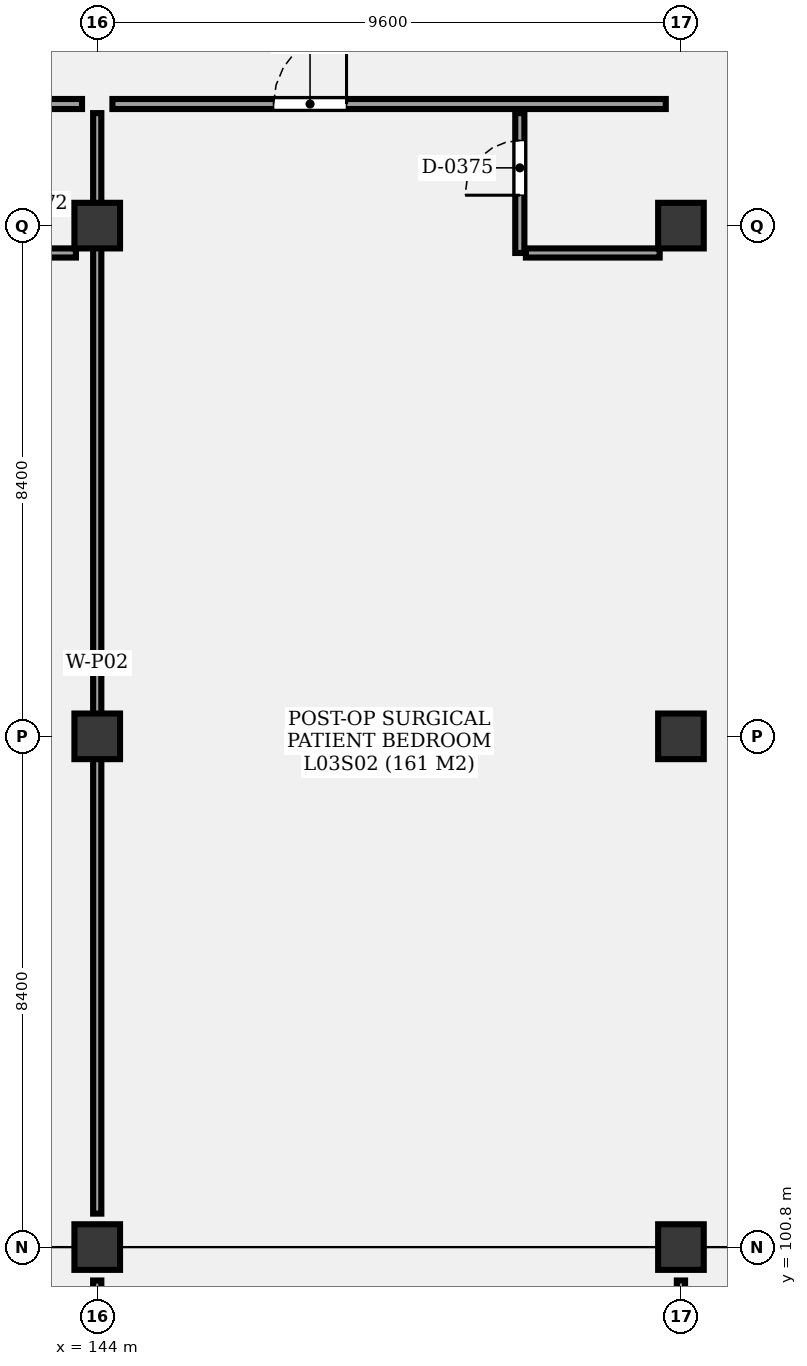
"""IFC4 building model, lengths in metres.
Left out: names, types, materials, properties, quantities, classifications, styles, units other than length and angle.
Written with IfcOpenShell. Run it as: python <this file> out.ifc"""

import sys

from ifc_helpers import new_model, si_unit, direction, frame, frame_2d, origin, origin_2d, place, context, subcontext, project, spatial, rectangle, extrude, element, fill, save


model = new_model("IFC4")
c1 = context("Model", 3, precision=1e-05, world=origin(), true_north=direction((0.0, 1.0)))
c2 = subcontext(c1, "Body", "Model", "MODEL_VIEW")
j1 = project(units=[si_unit("LENGTHUNIT", "METRE"), si_unit("PLANEANGLEUNIT", "RADIAN")], contexts=[c1])
p1 = place(None, origin())
s1 = spatial("IfcSite", under=j1, at=p1, CompositionType="ELEMENT")
p2 = place(p1, origin())
s2 = spatial("IfcBuilding", under=s1, at=p2, CompositionType="ELEMENT")
p3 = place(p2, frame((0.0, 0.0, 13.5)))
s3 = spatial("IfcBuildingStorey", under=s2, at=p3, CompositionType="ELEMENT", Elevation=13.5)
for number, where, z_axis, x_axis in (
    (1, (144.0, 100.8, 0.0), (0.0, 0.0, 1.0), (1.0, 0.0, 0.0)),
    (2, (144.0, 109.2, 0.0), (0.0, 0.0, 1.0), (1.0, 0.0, 0.0)),
    (3, (144.0, 117.6, 0.0), (0.0, 0.0, 1.0), (1.0, 0.0, 0.0)),
    (4, (153.6, 100.8, 0.0), (0.0, 0.0, 1.0), (1.0, 0.0, 0.0)),
    (5, (153.6, 109.2, 0.0), (0.0, 0.0, 1.0), (1.0, 0.0, 0.0)),
    (6, (153.6, 117.6, 0.0), (0.0, 0.0, 1.0), (1.0, 0.0, 0.0)),
):
    element("IfcColumn", number, at=place(p3, frame(where, z_axis=z_axis, x_axis=x_axis)), inside=s3, PredefinedType="COLUMN", context=c2, shape_type="SweptSolid", body=[
        extrude(rectangle(XDim=0.75, YDim=0.75, at=origin_2d()), origin(), (0.0, 0.0, 1.0), 4.3),
    ])
p4 = place(p3, frame((134.65, 119.6, 0.0), z_axis=(0.0, 0.0, 1.0), x_axis=(1.0, 0.0, 0.0)))
e7 = element("IfcWall", 7, at=p4, inside=s3, PredefinedType="PARTITIONING", context=c2, shape_type="SweptSolid", body=[
    extrude(rectangle(XDim=9.1, YDim=0.165, at=frame_2d((4.55, 0.0))), origin(), (0.0, 0.0, 1.0), 3.4),
])
p5 = place(p4, frame((2.65, 0.0, 0.0)))
e8 = element("IfcOpeningElement", 8, at=p5, cuts=e7, PredefinedType="OPENING", context=c2, shape_type="SweptSolid", body=[
    extrude(rectangle(XDim=1.25, YDim=2.2, at=frame_2d((0.625, 1.1))), frame((0.0, 0.093, 0.0), z_axis=(0.0, -1.0, 0.0), x_axis=(1.0, 0.0, 0.0)), (0.0, 0.0, 1.0), 0.185),
])
p6 = place(p3, frame((141.45, 117.15, 0.0), z_axis=(0.0, 0.0, 1.0), x_axis=(1.0, 0.0, 0.0)))
e9 = element("IfcWall", 9, at=p6, inside=s3, PredefinedType="PARTITIONING", context=c2, shape_type="SweptSolid", body=[
    extrude(rectangle(XDim=2.2, YDim=0.15, at=frame_2d((1.1, 0.0))), origin(), (0.0, 0.0, 1.0), 3.4),
])
p7 = place(p3, frame((144.25, 119.6, 0.0), z_axis=(0.0, 0.0, 1.0), x_axis=(1.0, 0.0, 0.0)))
e10 = element("IfcWall", 10, at=p7, inside=s3, PredefinedType="PARTITIONING", context=c2, shape_type="SweptSolid", body=[
    extrude(rectangle(XDim=9.1, YDim=0.165, at=frame_2d((4.55, 0.0))), origin(), (0.0, 0.0, 1.0), 3.4),
])
p8 = place(p7, frame((2.65, 0.0, 0.0)))
e11 = element("IfcOpeningElement", 11, at=p8, cuts=e10, PredefinedType="OPENING", context=c2, shape_type="SweptSolid", body=[
    extrude(rectangle(XDim=1.2, YDim=2.2, at=frame_2d((0.6, 1.1))), frame((0.0, 0.093, 0.0), z_axis=(0.0, -1.0, 0.0), x_axis=(1.0, 0.0, 0.0)), (0.0, 0.0, 1.0), 0.185),
])
p9 = place(p3, frame((150.95, 117.15, 0.0), z_axis=(0.0, 0.0, 1.0), x_axis=(0.0, 1.0, 0.0)))
e12 = element("IfcWall", 12, at=p9, inside=s3, PredefinedType="PARTITIONING", context=c2, shape_type="SweptSolid", body=[
    extrude(rectangle(XDim=2.3, YDim=0.15, at=frame_2d((1.15, 0.0))), origin(), (0.0, 0.0, 1.0), 3.4),
])
p10 = place(p9, frame((0.95, 0.0, 0.0)))
e13 = element("IfcOpeningElement", 13, at=p10, cuts=e12, PredefinedType="OPENING", context=c2, shape_type="SweptSolid", body=[
    extrude(rectangle(XDim=0.9, YDim=2.1, at=frame_2d((0.45, 1.05))), frame((0.0, 0.085, 0.0), z_axis=(0.0, -1.0, 0.0), x_axis=(1.0, 0.0, 0.0)), (0.0, 0.0, 1.0), 0.17),
])
p11 = place(p3, frame((151.05, 117.15, 0.0), z_axis=(0.0, 0.0, 1.0), x_axis=(1.0, 0.0, 0.0)))
e14 = element("IfcWall", 14, at=p11, inside=s3, PredefinedType="PARTITIONING", context=c2, shape_type="SweptSolid", body=[
    extrude(rectangle(XDim=2.2, YDim=0.15, at=frame_2d((1.1, 0.0))), origin(), (0.0, 0.0, 1.0), 3.4),
])
p12 = place(p3, frame((144.0, 101.35, 0.0), z_axis=(0.0, 0.0, 1.0), x_axis=(0.0, 1.0, 0.0)))
e15 = element("IfcWall", 15, at=p12, inside=s3, PredefinedType="PARTITIONING", context=c2, shape_type="SweptSolid", body=[
    extrude(rectangle(XDim=18.1, YDim=0.135, at=frame_2d((9.05, 0.0))), origin(), (0.0, 0.0, 1.0), 3.4),
])
for number, where, z_axis, x_axis in (
    (16, (144.0, 90.55, 0.0), (0.0, 0.0, 1.0), (0.0, 1.0, 0.0)),
    (17, (153.6, 90.55, 0.0), (0.0, 0.0, 1.0), (0.0, 1.0, 0.0)),
):
    element("IfcWall", number, at=place(p3, frame(where, z_axis=z_axis, x_axis=x_axis)), inside=s3, PredefinedType="PARTITIONING", context=c2, shape_type="SweptSolid", body=[
        extrude(rectangle(XDim=9.7, YDim=0.135, at=frame_2d((4.85, 0.0))), origin(), (0.0, 0.0, 1.0), 3.4),
    ])
p13 = place(p8, origin())
e18 = element("IfcDoor", 18, at=p13, inside=s3, OperationType="SINGLE_SWING_RIGHT", PredefinedType="DOOR", context=c2, shape_type="SweptSolid", body=[
    extrude(rectangle(XDim=1.2, YDim=2.2, at=frame_2d((0.6, 1.1))), frame((0.0, 0.025, 0.0), z_axis=(0.0, -1.0, 0.0), x_axis=(1.0, 0.0, 0.0)), (0.0, 0.0, 1.0), 0.05),
])
fill(e11, e18)
p14 = place(p10, origin())
e19 = element("IfcDoor", 19, at=p14, inside=s3, OperationType="SINGLE_SWING_LEFT", PredefinedType="DOOR", context=c2, shape_type="SweptSolid", body=[
    extrude(rectangle(XDim=0.9, YDim=2.1, at=frame_2d((0.45, 1.05))), frame((0.0, 0.025, 0.0), z_axis=(0.0, -1.0, 0.0), x_axis=(1.0, 0.0, 0.0)), (0.0, 0.0, 1.0), 0.05),
])
fill(e13, e19)
save(model, sys.argv[1])
